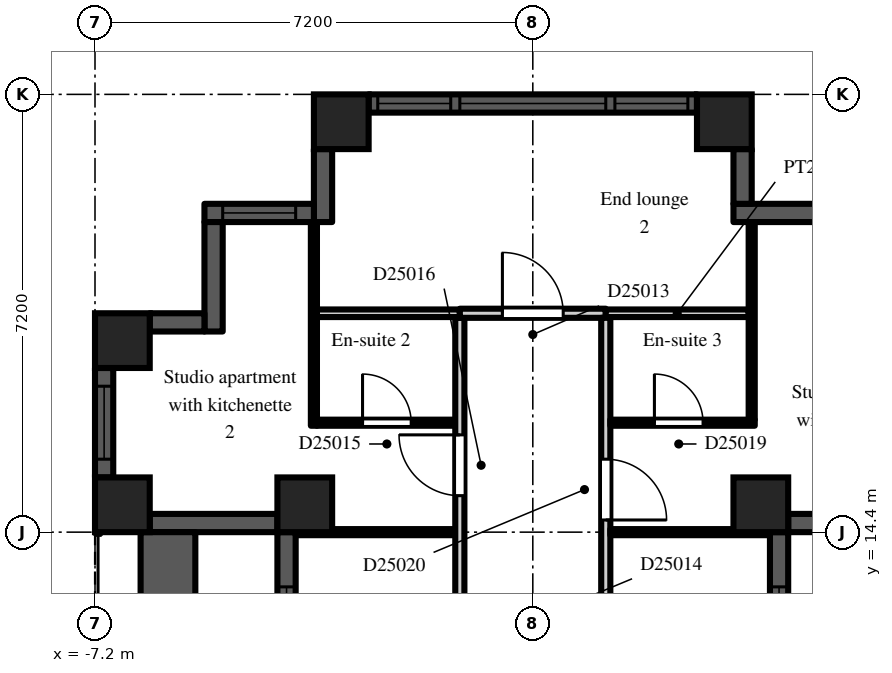
"""IFC4 building model, lengths in metres.
Left out: names, types, materials, properties, quantities, classifications, styles, units other than length and angle.
Written with IfcOpenShell. Run it as: python <this file> out.ifc"""

import sys

from ifc_helpers import new_model, si_unit, direction, frame, frame_2d, origin, origin_2d, place, context, subcontext, project, spatial, rectangle, extrude, element, fill, save


model = new_model("IFC4")
c1 = context("Model", 3, precision=1e-05, world=origin(), true_north=direction((0.0, 1.0)))
c2 = subcontext(c1, "Body", "Model", "MODEL_VIEW")
j1 = project(units=[si_unit("LENGTHUNIT", "METRE"), si_unit("PLANEANGLEUNIT", "RADIAN")], contexts=[c1])
p1 = place(None, origin())
s1 = spatial("IfcSite", under=j1, at=p1, CompositionType="ELEMENT")
p2 = place(p1, origin())
s2 = spatial("IfcBuilding", under=s1, at=p2, CompositionType="ELEMENT")
p3 = place(p2, frame((0.0, 0.0, 170.7)))
s3 = spatial("IfcBuildingStorey", under=s2, at=p3, CompositionType="ELEMENT", Elevation=170.7)
for number, where, z_axis, x_axis in (
    (1, (-6.75, 14.85, 0.0), (0.0, 0.0, 1.0), (1.0, 0.0, 0.0)),
    (2, (-6.75, 17.55, 0.0), (0.0, 0.0, 1.0), (1.0, 0.0, 0.0)),
    (3, (-3.75, 14.85, 0.0), (0.0, 0.0, 1.0), (1.0, 0.0, 0.0)),
    (4, (-3.15, 21.15, 0.0), (0.0, 0.0, 1.0), (1.0, 0.0, 0.0)),
    (5, (3.15, 21.15, 0.0), (0.0, 0.0, 1.0), (1.0, 0.0, 0.0)),
    (6, (3.75, 14.85, 0.0), (0.0, 0.0, 1.0), (1.0, 0.0, 0.0)),
):
    element("IfcColumn", number, at=place(p3, frame(where, z_axis=z_axis, x_axis=x_axis)), inside=s3, PredefinedType="COLUMN", context=c2, shape_type="SweptSolid", body=[
        extrude(rectangle(XDim=0.9, YDim=0.9, at=origin_2d()), origin(), (0.0, 0.0, 1.0), 3.0),
    ])
p4 = place(p3, frame((4.05, 7.2, 0.0), z_axis=(0.0, 0.0, 1.0), x_axis=(0.0, 1.0, 0.0)))
e7 = element("IfcWall", 7, at=p4, inside=s3, PredefinedType="SOLIDWALL", context=c2, shape_type="SweptSolid", body=[
    extrude(rectangle(XDim=7.2, YDim=0.3, at=frame_2d((3.6, 0.0))), origin(), (0.0, 0.0, 1.0), 2.2),
])
p5 = place(p4, frame((3.0, 0.0, 0.0)))
e8 = element("IfcOpeningElement", 8, at=p5, cuts=e7, PredefinedType="OPENING", context=c2, shape_type="SweptSolid", body=[
    extrude(rectangle(XDim=1.2, YDim=2.05, at=frame_2d((0.6, 1.025))), frame((0.0, 0.16, 0.0), z_axis=(0.0, -1.0, 0.0), x_axis=(1.0, 0.0, 0.0)), (0.0, 0.0, 1.0), 0.32),
])
p6 = place(p4, frame((0.9, 0.0, 0.2)))
e9 = element("IfcOpeningElement", 9, at=p6, cuts=e7, PredefinedType="OPENING", context=c2, shape_type="SweptSolid", body=[
    extrude(rectangle(XDim=1.8, YDim=1.85, at=frame_2d((0.9, 0.925))), frame((0.0, 0.16, 0.0), z_axis=(0.0, -1.0, 0.0), x_axis=(1.0, 0.0, 0.0)), (0.0, 0.0, 1.0), 0.32),
])
p7 = place(p4, frame((4.5, 0.0, 0.2)))
e10 = element("IfcOpeningElement", 10, at=p7, cuts=e7, PredefinedType="OPENING", context=c2, shape_type="SweptSolid", body=[
    extrude(rectangle(XDim=1.8, YDim=1.85, at=frame_2d((0.9, 0.925))), frame((0.0, 0.16, 0.0), z_axis=(0.0, -1.0, 0.0), x_axis=(1.0, 0.0, 0.0)), (0.0, 0.0, 1.0), 0.32),
])
p8 = place(p3, frame((4.2, 14.55, 0.0), z_axis=(0.0, 0.0, 1.0), x_axis=(1.0, 0.0, 0.0)))
e11 = element("IfcWall", 11, at=p8, inside=s3, PredefinedType="SOLIDWALL", context=c2, shape_type="SweptSolid", body=[
    extrude(rectangle(XDim=2.1, YDim=0.3, at=frame_2d((1.05, 0.0))), origin(), (0.0, 0.0, 1.0), 2.2),
])
p9 = place(p3, frame((5.1, 19.65, 0.0), z_axis=(0.0, 0.0, 1.0), x_axis=(-1.0, 0.0, 0.0)))
e12 = element("IfcWall", 12, at=p9, inside=s3, PredefinedType="SOLIDWALL", context=c2, shape_type="SweptSolid", body=[
    extrude(rectangle(XDim=1.8, YDim=0.3, at=frame_2d((0.9, 0.0))), origin(), (0.0, 0.0, 1.0), 2.6),
])
p10 = place(p3, frame((3.45, 19.8, 0.0), z_axis=(0.0, 0.0, 1.0), x_axis=(0.0, 1.0, 0.0)))
e13 = element("IfcWall", 13, at=p10, inside=s3, PredefinedType="SOLIDWALL", context=c2, shape_type="SweptSolid", body=[
    extrude(rectangle(XDim=0.9, YDim=0.3, at=frame_2d((0.45, 0.0))), origin(), (0.0, 0.0, 1.0), 2.6),
])
p11 = place(p3, frame((2.7, 21.45, 0.0), z_axis=(0.0, 0.0, 1.0), x_axis=(-1.0, 0.0, 0.0)))
e14 = element("IfcWall", 14, at=p11, inside=s3, PredefinedType="SOLIDWALL", context=c2, shape_type="SweptSolid", body=[
    extrude(rectangle(XDim=5.4, YDim=0.3, at=frame_2d((2.7, 0.0))), origin(), (0.0, 0.0, 1.0), 2.2),
])
p12 = place(p11, frame((1.5, 0.0, 0.2)))
e15 = element("IfcOpeningElement", 15, at=p12, cuts=e14, PredefinedType="OPENING", context=c2, shape_type="SweptSolid", body=[
    extrude(rectangle(XDim=2.4, YDim=1.85, at=frame_2d((1.2, 0.925))), frame((0.0, 0.16, 0.0), z_axis=(0.0, -1.0, 0.0), x_axis=(1.0, 0.0, 0.0)), (0.0, 0.0, 1.0), 0.32),
])
p13 = place(p11, frame((0.15, 0.0, 0.2)))
e16 = element("IfcOpeningElement", 16, at=p13, cuts=e14, PredefinedType="OPENING", context=c2, shape_type="SweptSolid", body=[
    extrude(rectangle(XDim=1.2, YDim=1.85, at=frame_2d((0.6, 0.925))), frame((0.0, 0.16, 0.0), z_axis=(0.0, -1.0, 0.0), x_axis=(1.0, 0.0, 0.0)), (0.0, 0.0, 1.0), 0.32),
])
p14 = place(p11, frame((4.05, 0.0, 0.2)))
e17 = element("IfcOpeningElement", 17, at=p14, cuts=e14, PredefinedType="OPENING", context=c2, shape_type="SweptSolid", body=[
    extrude(rectangle(XDim=1.2, YDim=1.85, at=frame_2d((0.6, 0.925))), frame((0.0, 0.16, 0.0), z_axis=(0.0, -1.0, 0.0), x_axis=(1.0, 0.0, 0.0)), (0.0, 0.0, 1.0), 0.32),
])
p15 = place(p3, frame((-3.45, 20.7, 0.0), z_axis=(0.0, 0.0, 1.0), x_axis=(0.0, -1.0, 0.0)))
e18 = element("IfcWall", 18, at=p15, inside=s3, PredefinedType="SOLIDWALL", context=c2, shape_type="SweptSolid", body=[
    extrude(rectangle(XDim=1.2, YDim=0.3, at=frame_2d((0.6, 0.0))), origin(), (0.0, 0.0, 1.0), 2.6),
])
p16 = place(p3, frame((-3.6, 19.65, 0.0), z_axis=(0.0, 0.0, 1.0), x_axis=(-1.0, 0.0, 0.0)))
e19 = element("IfcWall", 19, at=p16, inside=s3, PredefinedType="SOLIDWALL", context=c2, shape_type="SweptSolid", body=[
    extrude(rectangle(XDim=1.8, YDim=0.3, at=frame_2d((0.9, 0.0))), origin(), (0.0, 0.0, 1.0), 2.6),
])
p17 = place(p16, frame((0.3, 0.0, 0.2)))
e20 = element("IfcOpeningElement", 20, at=p17, cuts=e19, PredefinedType="OPENING", context=c2, shape_type="SweptSolid", body=[
    extrude(rectangle(XDim=1.2, YDim=1.85, at=frame_2d((0.6, 0.925))), frame((0.0, 0.16, 0.0), z_axis=(0.0, -1.0, 0.0), x_axis=(1.0, 0.0, 0.0)), (0.0, 0.0, 1.0), 0.32),
])
p18 = place(p3, frame((-5.25, 19.5, 0.0), z_axis=(0.0, 0.0, 1.0), x_axis=(0.0, -1.0, 0.0)))
e21 = element("IfcWall", 21, at=p18, inside=s3, PredefinedType="SOLIDWALL", context=c2, shape_type="SweptSolid", body=[
    extrude(rectangle(XDim=1.8, YDim=0.3, at=frame_2d((0.9, 0.0))), origin(), (0.0, 0.0, 1.0), 2.6),
])
p19 = place(p3, frame((-5.4, 17.85, 0.0), z_axis=(0.0, 0.0, 1.0), x_axis=(-1.0, 0.0, 0.0)))
e22 = element("IfcWall", 22, at=p19, inside=s3, PredefinedType="SOLIDWALL", context=c2, shape_type="SweptSolid", body=[
    extrude(rectangle(XDim=0.9, YDim=0.3, at=frame_2d((0.45, 0.0))), origin(), (0.0, 0.0, 1.0), 2.6),
])
p20 = place(p3, frame((-7.05, 17.1, 0.0), z_axis=(0.0, 0.0, 1.0), x_axis=(0.0, -1.0, 0.0)))
e23 = element("IfcWall", 23, at=p20, inside=s3, PredefinedType="SOLIDWALL", context=c2, shape_type="SweptSolid", body=[
    extrude(rectangle(XDim=1.8, YDim=0.3, at=frame_2d((0.9, 0.0))), origin(), (0.0, 0.0, 1.0), 2.2),
])
p21 = place(p20, frame((0.3, 0.0, 0.2)))
e24 = element("IfcOpeningElement", 24, at=p21, cuts=e23, PredefinedType="OPENING", context=c2, shape_type="SweptSolid", body=[
    extrude(rectangle(XDim=1.2, YDim=1.85, at=frame_2d((0.6, 0.925))), frame((0.0, 0.16, 0.0), z_axis=(0.0, -1.0, 0.0), x_axis=(1.0, 0.0, 0.0)), (0.0, 0.0, 1.0), 0.32),
])
p22 = place(p3, frame((-6.3, 14.55, 0.0), z_axis=(0.0, 0.0, 1.0), x_axis=(1.0, 0.0, 0.0)))
e25 = element("IfcWall", 25, at=p22, inside=s3, PredefinedType="SOLIDWALL", context=c2, shape_type="SweptSolid", body=[
    extrude(rectangle(XDim=2.1, YDim=0.3, at=frame_2d((1.05, 0.0))), origin(), (0.0, 0.0, 1.0), 2.2),
])
p23 = place(p3, frame((-4.05, 14.4, 0.0), z_axis=(0.0, 0.0, 1.0), x_axis=(0.0, -1.0, 0.0)))
e26 = element("IfcWall", 26, at=p23, inside=s3, PredefinedType="SOLIDWALL", context=c2, shape_type="SweptSolid", body=[
    extrude(rectangle(XDim=7.2, YDim=0.3, at=frame_2d((3.6, 0.0))), origin(), (0.0, 0.0, 1.0), 2.2),
])
p24 = place(p23, frame((3.0, 0.0, 0.0)))
e27 = element("IfcOpeningElement", 27, at=p24, cuts=e26, PredefinedType="OPENING", context=c2, shape_type="SweptSolid", body=[
    extrude(rectangle(XDim=1.2, YDim=2.05, at=frame_2d((0.6, 1.025))), frame((0.0, 0.16, 0.0), z_axis=(0.0, -1.0, 0.0), x_axis=(1.0, 0.0, 0.0)), (0.0, 0.0, 1.0), 0.32),
])
p25 = place(p23, frame((0.9, 0.0, 0.2)))
e28 = element("IfcOpeningElement", 28, at=p25, cuts=e26, PredefinedType="OPENING", context=c2, shape_type="SweptSolid", body=[
    extrude(rectangle(XDim=1.8, YDim=1.85, at=frame_2d((0.9, 0.925))), frame((0.0, 0.16, 0.0), z_axis=(0.0, -1.0, 0.0), x_axis=(1.0, 0.0, 0.0)), (0.0, 0.0, 1.0), 0.32),
])
p26 = place(p23, frame((4.5, 0.0, 0.2)))
e29 = element("IfcOpeningElement", 29, at=p26, cuts=e26, PredefinedType="OPENING", context=c2, shape_type="SweptSolid", body=[
    extrude(rectangle(XDim=1.8, YDim=1.85, at=frame_2d((0.9, 0.925))), frame((0.0, 0.16, 0.0), z_axis=(0.0, -1.0, 0.0), x_axis=(1.0, 0.0, 0.0)), (0.0, 0.0, 1.0), 0.32),
])
p27 = place(p3, frame((-6.0, 7.2, 0.0), z_axis=(0.0, 0.0, 1.0), x_axis=(0.0, 1.0, 0.0)))
e30 = element("IfcWall", 30, at=p27, inside=s3, PredefinedType="PARAPET", context=c2, shape_type="SweptSolid", body=[
    extrude(rectangle(XDim=7.2, YDim=0.9, at=frame_2d((3.6, 0.0))), origin(), (0.0, 0.0, 1.0), 0.8),
])
p28 = place(p3, frame((-3.9, 14.4, 0.0), z_axis=(0.0, 0.0, 1.0), x_axis=(1.0, 0.0, 0.0)))
e31 = element("IfcWall", 31, at=p28, inside=s3, PredefinedType="PARTITIONING", context=c2, shape_type="SweptSolid", body=[
    extrude(rectangle(XDim=2.625, YDim=0.1, at=frame_2d((1.312, 0.0))), origin(), (0.0, 0.0, 1.0), 2.6),
])
p29 = place(p3, frame((-3.6, 16.15, 0.0), z_axis=(0.0, 0.0, 1.0), x_axis=(0.0, 1.0, 0.0)))
e32 = element("IfcWall", 32, at=p29, inside=s3, PredefinedType="PARTITIONING", context=c2, shape_type="SweptSolid", body=[
    extrude(rectangle(XDim=3.35, YDim=0.1, at=frame_2d((1.675, 0.0))), origin(), (0.0, 0.0, 1.0), 2.6),
])
p30 = place(p3, frame((-3.55, 16.2, 0.0), z_axis=(0.0, 0.0, 1.0), x_axis=(1.0, 0.0, 0.0)))
e33 = element("IfcWall", 33, at=p30, inside=s3, PredefinedType="PARTITIONING", context=c2, shape_type="SweptSolid", body=[
    extrude(rectangle(XDim=2.275, YDim=0.1, at=frame_2d((1.138, 0.0))), origin(), (0.0, 0.0, 1.0), 2.6),
])
p31 = place(p30, frame((0.75, 0.0, 0.0)))
e34 = element("IfcOpeningElement", 34, at=p31, cuts=e33, PredefinedType="OPENING", context=c2, shape_type="SweptSolid", body=[
    extrude(rectangle(XDim=0.8, YDim=2.1, at=frame_2d((0.4, 1.05))), frame((0.0, 0.06, 0.0), z_axis=(0.0, -1.0, 0.0), x_axis=(1.0, 0.0, 0.0)), (0.0, 0.0, 1.0), 0.12),
])
p32 = place(p3, frame((-3.55, 18.0, 0.0), z_axis=(0.0, 0.0, 1.0), x_axis=(1.0, 0.0, 0.0)))
e35 = element("IfcWall", 35, at=p32, inside=s3, PredefinedType="PARTITIONING", context=c2, shape_type="SweptSolid", body=[
    extrude(rectangle(XDim=2.35, YDim=0.125, at=frame_2d((1.175, 0.0))), origin(), (0.0, 0.0, 1.0), 2.6),
])
p33 = place(p3, frame((-1.2, 1.275, 0.0), z_axis=(0.0, 0.0, 1.0), x_axis=(0.0, 1.0, 0.0)))
e36 = element("IfcWall", 36, at=p33, inside=s3, PredefinedType="PARTITIONING", context=c2, shape_type="SweptSolid", body=[
    extrude(rectangle(XDim=16.65, YDim=0.15, at=frame_2d((8.325, 0.0))), origin(), (0.0, 0.0, 1.0), 2.6),
])
p34 = place(p33, frame((2.475, 0.0, 0.0)))
e37 = element("IfcOpeningElement", 37, at=p34, cuts=e36, PredefinedType="OPENING", context=c2, shape_type="SweptSolid", body=[
    extrude(rectangle(XDim=0.9, YDim=2.1, at=frame_2d((0.45, 1.05))), frame((0.0, 0.085, 0.0), z_axis=(0.0, -1.0, 0.0), x_axis=(1.0, 0.0, 0.0)), (0.0, 0.0, 1.0), 0.17),
])
p35 = place(p33, frame((10.875, 0.0, 0.0)))
e38 = element("IfcOpeningElement", 38, at=p35, cuts=e36, PredefinedType="OPENING", context=c2, shape_type="SweptSolid", body=[
    extrude(rectangle(XDim=0.9, YDim=2.1, at=frame_2d((0.45, 1.05))), frame((0.0, 0.085, 0.0), z_axis=(0.0, -1.0, 0.0), x_axis=(1.0, 0.0, 0.0)), (0.0, 0.0, 1.0), 0.17),
])
p36 = place(p33, frame((13.725, 0.0, 0.0)))
e39 = element("IfcOpeningElement", 39, at=p36, cuts=e36, PredefinedType="OPENING", context=c2, shape_type="SweptSolid", body=[
    extrude(rectangle(XDim=1.0, YDim=2.1, at=frame_2d((0.5, 1.05))), frame((0.0, 0.085, 0.0), z_axis=(0.0, -1.0, 0.0), x_axis=(1.0, 0.0, 0.0)), (0.0, 0.0, 1.0), 0.17),
])
p37 = place(p3, frame((-1.2, 18.0, 0.0), z_axis=(0.0, 0.0, 1.0), x_axis=(1.0, 0.0, 0.0)))
e40 = element("IfcWall", 40, at=p37, inside=s3, PredefinedType="PARTITIONING", context=c2, shape_type="SweptSolid", body=[
    extrude(rectangle(XDim=2.4, YDim=0.15, at=frame_2d((1.2, 0.0))), origin(), (0.0, 0.0, 1.0), 2.6),
])
p38 = place(p37, frame((0.7, 0.0, 0.0)))
e41 = element("IfcOpeningElement", 41, at=p38, cuts=e40, PredefinedType="OPENING", context=c2, shape_type="SweptSolid", body=[
    extrude(rectangle(XDim=1.0, YDim=2.1, at=frame_2d((0.5, 1.05))), frame((0.0, 0.085, 0.0), z_axis=(0.0, -1.0, 0.0), x_axis=(1.0, 0.0, 0.0)), (0.0, 0.0, 1.0), 0.17),
])
p39 = place(p3, frame((1.2, 1.125, 0.0), z_axis=(0.0, 0.0, 1.0), x_axis=(0.0, 1.0, 0.0)))
e42 = element("IfcWall", 42, at=p39, inside=s3, PredefinedType="PARTITIONING", context=c2, shape_type="SweptSolid", body=[
    extrude(rectangle(XDim=16.8, YDim=0.15, at=frame_2d((8.4, 0.0))), origin(), (0.0, 0.0, 1.0), 2.6),
])
p40 = place(p39, frame((7.025, 0.0, 0.0)))
e43 = element("IfcOpeningElement", 43, at=p40, cuts=e42, PredefinedType="OPENING", context=c2, shape_type="SweptSolid", body=[
    extrude(rectangle(XDim=0.9, YDim=2.1, at=frame_2d((0.45, 1.05))), frame((0.0, 0.085, 0.0), z_axis=(0.0, -1.0, 0.0), x_axis=(1.0, 0.0, 0.0)), (0.0, 0.0, 1.0), 0.17),
])
p41 = place(p39, frame((10.625, 0.0, 0.0)))
e44 = element("IfcOpeningElement", 44, at=p41, cuts=e42, PredefinedType="OPENING", context=c2, shape_type="SweptSolid", body=[
    extrude(rectangle(XDim=0.9, YDim=2.1, at=frame_2d((0.45, 1.05))), frame((0.0, 0.085, 0.0), z_axis=(0.0, -1.0, 0.0), x_axis=(1.0, 0.0, 0.0)), (0.0, 0.0, 1.0), 0.17),
])
p42 = place(p39, frame((13.475, 0.0, 0.0)))
e45 = element("IfcOpeningElement", 45, at=p42, cuts=e42, PredefinedType="OPENING", context=c2, shape_type="SweptSolid", body=[
    extrude(rectangle(XDim=1.0, YDim=2.1, at=frame_2d((0.5, 1.05))), frame((0.0, 0.085, 0.0), z_axis=(0.0, -1.0, 0.0), x_axis=(1.0, 0.0, 0.0)), (0.0, 0.0, 1.0), 0.17),
])
p43 = place(p3, frame((1.275, 14.4, 0.0), z_axis=(0.0, 0.0, 1.0), x_axis=(1.0, 0.0, 0.0)))
e46 = element("IfcWall", 46, at=p43, inside=s3, PredefinedType="PARTITIONING", context=c2, shape_type="SweptSolid", body=[
    extrude(rectangle(XDim=2.625, YDim=0.1, at=frame_2d((1.312, 0.0))), origin(), (0.0, 0.0, 1.0), 2.6),
])
p44 = place(p3, frame((1.275, 16.2, 0.0), z_axis=(0.0, 0.0, 1.0), x_axis=(1.0, 0.0, 0.0)))
e47 = element("IfcWall", 47, at=p44, inside=s3, PredefinedType="PARTITIONING", context=c2, shape_type="SweptSolid", body=[
    extrude(rectangle(XDim=2.375, YDim=0.1, at=frame_2d((1.188, 0.0))), origin(), (0.0, 0.0, 1.0), 2.6),
])
p45 = place(p44, frame((0.725, 0.0, 0.0)))
e48 = element("IfcOpeningElement", 48, at=p45, cuts=e47, PredefinedType="OPENING", context=c2, shape_type="SweptSolid", body=[
    extrude(rectangle(XDim=0.8, YDim=2.1, at=frame_2d((0.4, 1.05))), frame((0.0, 0.06, 0.0), z_axis=(0.0, -1.0, 0.0), x_axis=(1.0, 0.0, 0.0)), (0.0, 0.0, 1.0), 0.12),
])
p46 = place(p3, frame((1.2, 18.0, 0.0), z_axis=(0.0, 0.0, 1.0), x_axis=(1.0, 0.0, 0.0)))
e49 = element("IfcWall", 49, at=p46, inside=s3, PredefinedType="PARTITIONING", context=c2, shape_type="SweptSolid", body=[
    extrude(rectangle(XDim=2.35, YDim=0.125, at=frame_2d((1.175, 0.0))), origin(), (0.0, 0.0, 1.0), 2.6),
])
p47 = place(p3, frame((3.6, 16.25, 0.0), z_axis=(0.0, 0.0, 1.0), x_axis=(0.0, 1.0, 0.0)))
e50 = element("IfcWall", 50, at=p47, inside=s3, PredefinedType="PARTITIONING", context=c2, shape_type="SweptSolid", body=[
    extrude(rectangle(XDim=3.25, YDim=0.1, at=frame_2d((1.625, 0.0))), origin(), (0.0, 0.0, 1.0), 2.6),
])
p48 = place(p7, origin())
e51 = element("IfcWindow", 51, at=p48, inside=s3, PartitioningType="SINGLE_PANEL", PredefinedType="WINDOW", context=c2, shape_type="SweptSolid", body=[
    extrude(rectangle(XDim=1.8, YDim=1.85, at=frame_2d((0.9, 0.925))), frame((0.0, 0.03, 0.0), z_axis=(0.0, -1.0, 0.0), x_axis=(1.0, 0.0, 0.0)), (0.0, 0.0, 1.0), 0.06),
])
fill(e10, e51)
p49 = place(p12, origin())
e52 = element("IfcWindow", 52, at=p49, inside=s3, PartitioningType="SINGLE_PANEL", PredefinedType="WINDOW", context=c2, shape_type="SweptSolid", body=[
    extrude(rectangle(XDim=2.4, YDim=1.85, at=frame_2d((1.2, 0.925))), frame((0.0, 0.03, 0.0), z_axis=(0.0, -1.0, 0.0), x_axis=(1.0, 0.0, 0.0)), (0.0, 0.0, 1.0), 0.06),
])
fill(e15, e52)
p50 = place(p13, origin())
e53 = element("IfcWindow", 53, at=p50, inside=s3, PartitioningType="SINGLE_PANEL", PredefinedType="WINDOW", context=c2, shape_type="SweptSolid", body=[
    extrude(rectangle(XDim=1.2, YDim=1.85, at=frame_2d((0.6, 0.925))), frame((0.0, 0.03, 0.0), z_axis=(0.0, -1.0, 0.0), x_axis=(1.0, 0.0, 0.0)), (0.0, 0.0, 1.0), 0.06),
])
fill(e16, e53)
p51 = place(p14, origin())
e54 = element("IfcWindow", 54, at=p51, inside=s3, PartitioningType="SINGLE_PANEL", PredefinedType="WINDOW", context=c2, shape_type="SweptSolid", body=[
    extrude(rectangle(XDim=1.2, YDim=1.85, at=frame_2d((0.6, 0.925))), frame((0.0, 0.03, 0.0), z_axis=(0.0, -1.0, 0.0), x_axis=(1.0, 0.0, 0.0)), (0.0, 0.0, 1.0), 0.06),
])
fill(e17, e54)
p52 = place(p17, origin())
e55 = element("IfcWindow", 55, at=p52, inside=s3, PartitioningType="SINGLE_PANEL", PredefinedType="WINDOW", context=c2, shape_type="SweptSolid", body=[
    extrude(rectangle(XDim=1.2, YDim=1.85, at=frame_2d((0.6, 0.925))), frame((0.0, 0.03, 0.0), z_axis=(0.0, -1.0, 0.0), x_axis=(1.0, 0.0, 0.0)), (0.0, 0.0, 1.0), 0.06),
])
fill(e20, e55)
p53 = place(p21, origin())
e56 = element("IfcWindow", 56, at=p53, inside=s3, PartitioningType="SINGLE_PANEL", PredefinedType="WINDOW", context=c2, shape_type="SweptSolid", body=[
    extrude(rectangle(XDim=1.2, YDim=1.85, at=frame_2d((0.6, 0.925))), frame((0.0, 0.03, 0.0), z_axis=(0.0, -1.0, 0.0), x_axis=(1.0, 0.0, 0.0)), (0.0, 0.0, 1.0), 0.06),
])
fill(e24, e56)
p54 = place(p25, origin())
e57 = element("IfcWindow", 57, at=p54, inside=s3, PartitioningType="SINGLE_PANEL", PredefinedType="WINDOW", context=c2, shape_type="SweptSolid", body=[
    extrude(rectangle(XDim=1.8, YDim=1.85, at=frame_2d((0.9, 0.925))), frame((0.0, 0.03, 0.0), z_axis=(0.0, -1.0, 0.0), x_axis=(1.0, 0.0, 0.0)), (0.0, 0.0, 1.0), 0.06),
])
fill(e28, e57)
p55 = place(p38, origin())
e58 = element("IfcDoor", 58, at=p55, inside=s3, OperationType="SINGLE_SWING_LEFT", PredefinedType="DOOR", context=c2, shape_type="SweptSolid", body=[
    extrude(rectangle(XDim=1.0, YDim=2.1, at=frame_2d((0.5, 1.05))), frame((0.0, 0.025, 0.0), z_axis=(0.0, -1.0, 0.0), x_axis=(1.0, 0.0, 0.0)), (0.0, 0.0, 1.0), 0.05),
])
fill(e41, e58)
p56 = place(p31, origin())
e59 = element("IfcDoor", 59, at=p56, inside=s3, OperationType="SINGLE_SWING_LEFT", PredefinedType="DOOR", context=c2, shape_type="SweptSolid", body=[
    extrude(rectangle(XDim=0.8, YDim=2.1, at=frame_2d((0.4, 1.05))), frame((0.0, 0.025, 0.0), z_axis=(0.0, -1.0, 0.0), x_axis=(1.0, 0.0, 0.0)), (0.0, 0.0, 1.0), 0.05),
])
fill(e34, e59)
p57 = place(p36, origin())
e60 = element("IfcDoor", 60, at=p57, inside=s3, OperationType="SINGLE_SWING_RIGHT", PredefinedType="DOOR", context=c2, shape_type="SweptSolid", body=[
    extrude(rectangle(XDim=1.0, YDim=2.1, at=frame_2d((0.5, 1.05))), frame((0.0, 0.025, 0.0), z_axis=(0.0, -1.0, 0.0), x_axis=(1.0, 0.0, 0.0)), (0.0, 0.0, 1.0), 0.05),
])
fill(e39, e60)
p58 = place(p45, origin())
e61 = element("IfcDoor", 61, at=p58, inside=s3, OperationType="SINGLE_SWING_LEFT", PredefinedType="DOOR", context=c2, shape_type="SweptSolid", body=[
    extrude(rectangle(XDim=0.8, YDim=2.1, at=frame_2d((0.4, 1.05))), frame((0.0, 0.025, 0.0), z_axis=(0.0, -1.0, 0.0), x_axis=(1.0, 0.0, 0.0)), (0.0, 0.0, 1.0), 0.05),
])
fill(e48, e61)
p59 = place(p42, frame((1.0, 0.0, 0.0), z_axis=(0.0, 0.0, 1.0), x_axis=(-1.0, 0.0, 0.0)))
e62 = element("IfcDoor", 62, at=p59, inside=s3, OperationType="SINGLE_SWING_RIGHT", PredefinedType="DOOR", context=c2, shape_type="SweptSolid", body=[
    extrude(rectangle(XDim=1.0, YDim=2.1, at=frame_2d((0.5, 1.05))), frame((0.0, 0.025, 0.0), z_axis=(0.0, -1.0, 0.0), x_axis=(1.0, 0.0, 0.0)), (0.0, 0.0, 1.0), 0.05),
])
fill(e45, e62)
save(model, sys.argv[1])
